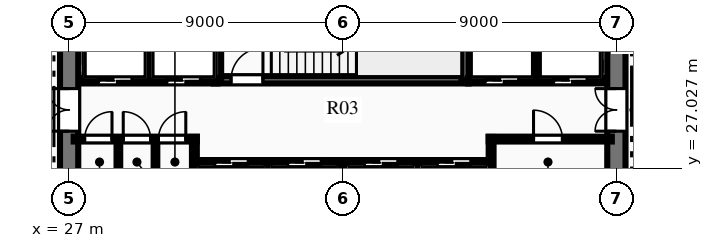
"""IFC4 building model, lengths in metres.
Left out: names, types, materials, properties, quantities, classifications, styles, units other than length and angle.
Written with IfcOpenShell. Run it as: python <this file> out.ifc"""

import sys

from ifc_helpers import new_model, si_unit, direction, frame, frame_2d, origin, place, context, subcontext, project, spatial, rectangle, extrude, element, fill, save


model = new_model("IFC4")
c1 = context("Model", 3, precision=1e-05, world=origin(), true_north=direction((0.0, 1.0)))
c2 = subcontext(c1, "Body", "Model", "MODEL_VIEW")
j1 = project(units=[si_unit("LENGTHUNIT", "METRE"), si_unit("PLANEANGLEUNIT", "RADIAN")], contexts=[c1])
p1 = place(None, origin())
s1 = spatial("IfcSite", under=j1, at=p1, CompositionType="ELEMENT")
p2 = place(p1, origin())
s2 = spatial("IfcBuilding", under=s1, at=p2, CompositionType="ELEMENT")
p3 = place(p2, frame((0.0, 0.0, 73.95)))
s3 = spatial("IfcBuildingStorey", under=s2, at=p3, CompositionType="ELEMENT", Elevation=73.95)
p4 = place(p3, frame((27.0, 18.3, 0.0), z_axis=(0.0, 0.0, 1.0), x_axis=(0.0, 1.0, 0.0)))
e1 = element("IfcWall", 1, at=p4, inside=s3, PredefinedType="SHEAR", context=c2, shape_type="SweptSolid", body=[
    extrude(rectangle(XDim=15.4, YDim=0.6, at=frame_2d((7.7, 0.0))), origin(), (0.0, 0.0, 1.0), 3.75),
])
p5 = place(p4, frame((9.94, 0.0, 0.0)))
e2 = element("IfcOpeningElement", 2, at=p5, cuts=e1, PredefinedType="OPENING", context=c2, shape_type="SweptSolid", body=[
    extrude(rectangle(XDim=1.4, YDim=2.2, at=frame_2d((0.7, 1.1))), frame((0.0, 0.31, 0.0), z_axis=(0.0, -1.0, 0.0), x_axis=(1.0, 0.0, 0.0)), (0.0, 0.0, 1.0), 0.62),
])
p6 = place(p3, frame((45.0, 18.3, 0.0), z_axis=(0.0, 0.0, 1.0), x_axis=(0.0, 1.0, 0.0)))
e3 = element("IfcWall", 3, at=p6, inside=s3, PredefinedType="SHEAR", context=c2, shape_type="SweptSolid", body=[
    extrude(rectangle(XDim=15.4, YDim=0.6, at=frame_2d((7.7, 0.0))), origin(), (0.0, 0.0, 1.0), 3.75),
])
p7 = place(p6, frame((9.94, 0.0, 0.0)))
e4 = element("IfcOpeningElement", 4, at=p7, cuts=e3, PredefinedType="OPENING", context=c2, shape_type="SweptSolid", body=[
    extrude(rectangle(XDim=1.4, YDim=2.2, at=frame_2d((0.7, 1.1))), frame((0.0, 0.31, 0.0), z_axis=(0.0, -1.0, 0.0), x_axis=(1.0, 0.0, 0.0)), (0.0, 0.0, 1.0), 0.62),
])
p8 = place(p3, frame((31.76, 29.93, 0.0), z_axis=(0.0, 0.0, 1.0), x_axis=(1.0, 0.0, 0.0)))
e5 = element("IfcWall", 5, at=p8, inside=s3, PredefinedType="SHEAR", context=c2, shape_type="SweptSolid", body=[
    extrude(rectangle(XDim=8.38, YDim=0.24, at=frame_2d((4.19, 0.0))), origin(), (0.0, 0.0, 1.0), 3.75),
])
p9 = place(p8, frame((0.565, 0.0, 0.0)))
e6 = element("IfcOpeningElement", 6, at=p9, cuts=e5, PredefinedType="OPENING", context=c2, shape_type="SweptSolid", body=[
    extrude(rectangle(XDim=1.05, YDim=2.15, at=frame_2d((0.525, 1.075))), frame((0.0, 0.13, 0.0), z_axis=(0.0, -1.0, 0.0), x_axis=(1.0, 0.0, 0.0)), (0.0, 0.0, 1.0), 0.26),
])
p10 = place(p3, frame((31.88, 29.93, 0.0), z_axis=(0.0, 0.0, 1.0), x_axis=(0.0, 1.0, 0.0)))
e7 = element("IfcWall", 7, at=p10, inside=s3, PredefinedType="SHEAR", context=c2, shape_type="SweptSolid", body=[
    extrude(rectangle(XDim=3.79, YDim=0.24, at=frame_2d((1.895, 0.0))), origin(), (0.0, 0.0, 1.0), 3.75),
])
p11 = place(p3, frame((40.02, 29.93, 0.0), z_axis=(0.0, 0.0, 1.0), x_axis=(0.0, 1.0, 0.0)))
e8 = element("IfcWall", 8, at=p11, inside=s3, PredefinedType="SHEAR", context=c2, shape_type="SweptSolid", body=[
    extrude(rectangle(XDim=3.85, YDim=0.24, at=frame_2d((1.925, 0.0))), origin(), (0.0, 0.0, 1.0), 3.75),
])
p12 = place(p3, frame((27.15, 27.98, 0.0), z_axis=(0.0, 0.0, 1.0), x_axis=(1.0, 0.0, 0.0)))
e9 = element("IfcWall", 9, at=p12, inside=s3, PredefinedType="PARTITIONING", context=c2, shape_type="SweptSolid", body=[
    extrude(rectangle(XDim=4.05, YDim=0.16, at=frame_2d((2.025, 0.0))), origin(), (0.0, 0.0, 1.0), 3.44),
])
p13 = place(p12, frame((0.36, 0.0, 0.0)))
e10 = element("IfcOpeningElement", 10, at=p13, cuts=e9, PredefinedType="OPENING", context=c2, shape_type="SweptSolid", body=[
    extrude(rectangle(XDim=0.9, YDim=2.15, at=frame_2d((0.45, 1.075))), frame((0.0, 0.09, 0.0), z_axis=(0.0, -1.0, 0.0), x_axis=(1.0, 0.0, 0.0)), (0.0, 0.0, 1.0), 0.18),
])
p14 = place(p12, frame((1.63, 0.0, 0.0)))
e11 = element("IfcOpeningElement", 11, at=p14, cuts=e9, PredefinedType="OPENING", context=c2, shape_type="SweptSolid", body=[
    extrude(rectangle(XDim=0.9, YDim=2.15, at=frame_2d((0.45, 1.075))), frame((0.0, 0.09, 0.0), z_axis=(0.0, -1.0, 0.0), x_axis=(1.0, 0.0, 0.0)), (0.0, 0.0, 1.0), 0.18),
])
p15 = place(p12, frame((2.788, 0.0, 0.0)))
e12 = element("IfcOpeningElement", 12, at=p15, cuts=e9, PredefinedType="OPENING", context=c2, shape_type="SweptSolid", body=[
    extrude(rectangle(XDim=0.9, YDim=2.15, at=frame_2d((0.45, 1.075))), frame((0.0, 0.09, 0.0), z_axis=(0.0, -1.0, 0.0), x_axis=(1.0, 0.0, 0.0)), (0.0, 0.0, 1.0), 0.18),
])
p16 = place(p3, frame((31.12, 26.54, 0.0), z_axis=(0.0, 0.0, 1.0), x_axis=(0.0, 1.0, 0.0)))
e13 = element("IfcWall", 13, at=p16, inside=s3, PredefinedType="PARTITIONING", context=c2, shape_type="SweptSolid", body=[
    extrude(rectangle(XDim=1.51, YDim=0.16, at=frame_2d((0.755, 0.0))), origin(), (0.0, 0.0, 1.0), 3.44),
])
p17 = place(p3, frame((40.8, 27.98, 0.0), z_axis=(0.0, 0.0, 1.0), x_axis=(1.0, 0.0, 0.0)))
e14 = element("IfcWall", 14, at=p17, inside=s3, PredefinedType="PARTITIONING", context=c2, shape_type="SweptSolid", body=[
    extrude(rectangle(XDim=4.05, YDim=0.16, at=frame_2d((2.025, 0.0))), origin(), (0.0, 0.0, 1.0), 3.44),
])
p18 = place(p17, frame((1.475, 0.0, 0.0)))
e15 = element("IfcOpeningElement", 15, at=p18, cuts=e14, PredefinedType="OPENING", context=c2, shape_type="SweptSolid", body=[
    extrude(rectangle(XDim=0.95, YDim=2.15, at=frame_2d((0.475, 1.075))), frame((0.0, 0.09, 0.0), z_axis=(0.0, -1.0, 0.0), x_axis=(1.0, 0.0, 0.0)), (0.0, 0.0, 1.0), 0.18),
])
p19 = place(p3, frame((40.88, 26.54, 0.0), z_axis=(0.0, 0.0, 1.0), x_axis=(0.0, 1.0, 0.0)))
e16 = element("IfcWall", 16, at=p19, inside=s3, PredefinedType="PARTITIONING", context=c2, shape_type="SweptSolid", body=[
    extrude(rectangle(XDim=1.51, YDim=0.16, at=frame_2d((0.755, 0.0))), origin(), (0.0, 0.0, 1.0), 3.44),
])
for number, where, z_axis, x_axis in (
    (17, (28.62, 26.54, 0.0), (0.0, 0.0, 1.0), (0.0, 1.0, 0.0)),
    (18, (29.84, 26.54, 0.0), (0.0, 0.0, 1.0), (0.0, 1.0, 0.0)),
):
    element("IfcWall", number, at=place(p3, frame(where, z_axis=z_axis, x_axis=x_axis)), inside=s3, PredefinedType="PARTITIONING", context=c2, shape_type="SweptSolid", body=[
        extrude(rectangle(XDim=1.44, YDim=0.12, at=frame_2d((0.72, 0.0))), origin(), (0.0, 0.0, 1.0), 3.44),
    ])
p20 = place(p3, frame((27.45, 29.9, 0.0), z_axis=(0.0, 0.0, 1.0), x_axis=(1.0, 0.0, 0.0)))
e19 = element("IfcWall", 19, at=p20, inside=s3, PredefinedType="PARTITIONING", context=c2, shape_type="SweptSolid", body=[
    extrude(rectangle(XDim=4.43, YDim=0.18, at=frame_2d((2.215, 0.0))), origin(), (0.0, 0.0, 1.0), 3.44),
])
p21 = place(p20, frame((0.515, 0.0, 0.0)))
e20 = element("IfcOpeningElement", 20, at=p21, cuts=e19, PredefinedType="OPENING", context=c2, shape_type="SweptSolid", body=[
    extrude(rectangle(XDim=1.1, YDim=2.15, at=frame_2d((0.55, 1.075))), frame((0.0, 0.1, 0.0), z_axis=(0.0, -1.0, 0.0), x_axis=(1.0, 0.0, 0.0)), (0.0, 0.0, 1.0), 0.2),
])
p22 = place(p20, frame((2.765, 0.0, 0.0)))
e21 = element("IfcOpeningElement", 21, at=p22, cuts=e19, PredefinedType="OPENING", context=c2, shape_type="SweptSolid", body=[
    extrude(rectangle(XDim=1.1, YDim=2.15, at=frame_2d((0.55, 1.075))), frame((0.0, 0.1, 0.0), z_axis=(0.0, -1.0, 0.0), x_axis=(1.0, 0.0, 0.0)), (0.0, 0.0, 1.0), 0.2),
])
p23 = place(p3, frame((29.63, 29.9, 0.0), z_axis=(0.0, 0.0, 1.0), x_axis=(0.0, 1.0, 0.0)))
e22 = element("IfcWall", 22, at=p23, inside=s3, PredefinedType="PARTITIONING", context=c2, shape_type="SweptSolid", body=[
    extrude(rectangle(XDim=3.75, YDim=0.18, at=frame_2d((1.875, 0.0))), origin(), (0.0, 0.0, 1.0), 3.44),
])
p24 = place(p3, frame((40.12, 29.9, 0.0), z_axis=(0.0, 0.0, 1.0), x_axis=(1.0, 0.0, 0.0)))
e23 = element("IfcWall", 23, at=p24, inside=s3, PredefinedType="PARTITIONING", context=c2, shape_type="SweptSolid", body=[
    extrude(rectangle(XDim=4.43, YDim=0.18, at=frame_2d((2.215, 0.0))), origin(), (0.0, 0.0, 1.0), 3.44),
])
p25 = place(p24, frame((0.565, 0.0, 0.0)))
e24 = element("IfcOpeningElement", 24, at=p25, cuts=e23, PredefinedType="OPENING", context=c2, shape_type="SweptSolid", body=[
    extrude(rectangle(XDim=1.1, YDim=2.15, at=frame_2d((0.55, 1.075))), frame((0.0, 0.1, 0.0), z_axis=(0.0, -1.0, 0.0), x_axis=(1.0, 0.0, 0.0)), (0.0, 0.0, 1.0), 0.2),
])
p26 = place(p24, frame((2.815, 0.0, 0.0)))
e25 = element("IfcOpeningElement", 25, at=p26, cuts=e23, PredefinedType="OPENING", context=c2, shape_type="SweptSolid", body=[
    extrude(rectangle(XDim=1.1, YDim=2.15, at=frame_2d((0.55, 1.075))), frame((0.0, 0.1, 0.0), z_axis=(0.0, -1.0, 0.0), x_axis=(1.0, 0.0, 0.0)), (0.0, 0.0, 1.0), 0.2),
])
p27 = place(p3, frame((42.37, 29.9, 0.0), z_axis=(0.0, 0.0, 1.0), x_axis=(0.0, 1.0, 0.0)))
e26 = element("IfcWall", 26, at=p27, inside=s3, PredefinedType="PARTITIONING", context=c2, shape_type="SweptSolid", body=[
    extrude(rectangle(XDim=3.75, YDim=0.18, at=frame_2d((1.875, 0.0))), origin(), (0.0, 0.0, 1.0), 3.44),
])
p28 = place(p3, frame((31.2, 27.2, 0.0), z_axis=(0.0, 0.0, 1.0), x_axis=(1.0, 0.0, 0.0)))
e27 = element("IfcWall", 27, at=p28, inside=s3, PredefinedType="PARTITIONING", context=c2, shape_type="SweptSolid", body=[
    extrude(rectangle(XDim=9.6, YDim=0.18, at=frame_2d((4.8, 0.0))), origin(), (0.0, 0.0, 1.0), 3.44),
])
p29 = place(p28, frame((0.59, 0.0, 0.0)))
e28 = element("IfcOpeningElement", 28, at=p29, cuts=e27, PredefinedType="OPENING", context=c2, shape_type="SweptSolid", body=[
    extrude(rectangle(XDim=1.1, YDim=2.15, at=frame_2d((0.55, 1.075))), frame((0.0, 0.1, 0.0), z_axis=(0.0, -1.0, 0.0), x_axis=(1.0, 0.0, 0.0)), (0.0, 0.0, 1.0), 0.2),
])
p30 = place(p28, frame((2.99, 0.0, 0.0)))
e29 = element("IfcOpeningElement", 29, at=p30, cuts=e27, PredefinedType="OPENING", context=c2, shape_type="SweptSolid", body=[
    extrude(rectangle(XDim=1.1, YDim=2.15, at=frame_2d((0.55, 1.075))), frame((0.0, 0.1, 0.0), z_axis=(0.0, -1.0, 0.0), x_axis=(1.0, 0.0, 0.0)), (0.0, 0.0, 1.0), 0.2),
])
p31 = place(p28, frame((5.51, 0.0, 0.0)))
e30 = element("IfcOpeningElement", 30, at=p31, cuts=e27, PredefinedType="OPENING", context=c2, shape_type="SweptSolid", body=[
    extrude(rectangle(XDim=1.1, YDim=2.15, at=frame_2d((0.55, 1.075))), frame((0.0, 0.1, 0.0), z_axis=(0.0, -1.0, 0.0), x_axis=(1.0, 0.0, 0.0)), (0.0, 0.0, 1.0), 0.2),
])
p32 = place(p28, frame((7.91, 0.0, 0.0)))
e31 = element("IfcOpeningElement", 31, at=p32, cuts=e27, PredefinedType="OPENING", context=c2, shape_type="SweptSolid", body=[
    extrude(rectangle(XDim=1.1, YDim=2.15, at=frame_2d((0.55, 1.075))), frame((0.0, 0.1, 0.0), z_axis=(0.0, -1.0, 0.0), x_axis=(1.0, 0.0, 0.0)), (0.0, 0.0, 1.0), 0.2),
])
for number, where, z_axis, x_axis in (
    (32, (33.54, 25.3, 0.0), (0.0, 0.0, 1.0), (0.0, 1.0, 0.0)),
    (33, (36.0, 25.3, 0.0), (0.0, 0.0, 1.0), (0.0, 1.0, 0.0)),
    (34, (38.46, 25.3, 0.0), (0.0, 0.0, 1.0), (0.0, 1.0, 0.0)),
):
    element("IfcWall", number, at=place(p3, frame(where, z_axis=z_axis, x_axis=x_axis)), inside=s3, PredefinedType="PARTITIONING", context=c2, shape_type="SweptSolid", body=[
        extrude(rectangle(XDim=1.9, YDim=0.18, at=frame_2d((0.95, 0.0))), origin(), (0.0, 0.0, 1.0), 3.44),
    ])
p33 = place(p13, origin())
e35 = element("IfcDoor", 35, at=p33, inside=s3, OperationType="SINGLE_SWING_RIGHT", PredefinedType="DOOR", context=c2, shape_type="SweptSolid", body=[
    extrude(rectangle(XDim=0.9, YDim=2.15, at=frame_2d((0.45, 1.075))), frame((0.0, 0.025, 0.0), z_axis=(0.0, -1.0, 0.0), x_axis=(1.0, 0.0, 0.0)), (0.0, 0.0, 1.0), 0.05),
])
fill(e10, e35)
p34 = place(p14, origin())
e36 = element("IfcDoor", 36, at=p34, inside=s3, OperationType="SINGLE_SWING_LEFT", PredefinedType="DOOR", context=c2, shape_type="SweptSolid", body=[
    extrude(rectangle(XDim=0.9, YDim=2.15, at=frame_2d((0.45, 1.075))), frame((0.0, 0.025, 0.0), z_axis=(0.0, -1.0, 0.0), x_axis=(1.0, 0.0, 0.0)), (0.0, 0.0, 1.0), 0.05),
])
fill(e11, e36)
p35 = place(p15, origin())
e37 = element("IfcDoor", 37, at=p35, inside=s3, OperationType="SINGLE_SWING_RIGHT", PredefinedType="DOOR", context=c2, shape_type="SweptSolid", body=[
    extrude(rectangle(XDim=0.9, YDim=2.15, at=frame_2d((0.45, 1.075))), frame((0.0, 0.025, 0.0), z_axis=(0.0, -1.0, 0.0), x_axis=(1.0, 0.0, 0.0)), (0.0, 0.0, 1.0), 0.05),
])
fill(e12, e37)
p36 = place(p18, origin())
e38 = element("IfcDoor", 38, at=p36, inside=s3, OperationType="SINGLE_SWING_LEFT", PredefinedType="DOOR", context=c2, shape_type="SweptSolid", body=[
    extrude(rectangle(XDim=0.95, YDim=2.15, at=frame_2d((0.475, 1.075))), frame((0.0, 0.025, 0.0), z_axis=(0.0, -1.0, 0.0), x_axis=(1.0, 0.0, 0.0)), (0.0, 0.0, 1.0), 0.05),
])
fill(e15, e38)
p37 = place(p9, origin())
e39 = element("IfcDoor", 39, at=p37, inside=s3, OperationType="SINGLE_SWING_RIGHT", PredefinedType="DOOR", context=c2, shape_type="SweptSolid", body=[
    extrude(rectangle(XDim=1.05, YDim=2.15, at=frame_2d((0.525, 1.075))), frame((0.0, 0.025, 0.0), z_axis=(0.0, -1.0, 0.0), x_axis=(1.0, 0.0, 0.0)), (0.0, 0.0, 1.0), 0.05),
])
fill(e6, e39)
p38 = place(p5, origin())
e40 = element("IfcDoor", 40, at=p38, inside=s3, OperationType="DOUBLE_DOOR_SINGLE_SWING", PredefinedType="DOOR", context=c2, shape_type="SweptSolid", body=[
    extrude(rectangle(XDim=1.4, YDim=2.2, at=frame_2d((0.7, 1.1))), frame((0.0, 0.025, 0.0), z_axis=(0.0, -1.0, 0.0), x_axis=(1.0, 0.0, 0.0)), (0.0, 0.0, 1.0), 0.05),
])
fill(e2, e40)
p39 = place(p7, origin())
e41 = element("IfcDoor", 41, at=p39, inside=s3, OperationType="DOUBLE_DOOR_SINGLE_SWING", PredefinedType="DOOR", context=c2, shape_type="SweptSolid", body=[
    extrude(rectangle(XDim=1.4, YDim=2.2, at=frame_2d((0.7, 1.1))), frame((0.0, 0.025, 0.0), z_axis=(0.0, -1.0, 0.0), x_axis=(1.0, 0.0, 0.0)), (0.0, 0.0, 1.0), 0.05),
])
fill(e4, e41)
p40 = place(p21, origin())
e42 = element("IfcDoor", 42, at=p40, inside=s3, OperationType="SLIDING_TO_LEFT", PredefinedType="DOOR", context=c2, shape_type="SweptSolid", body=[
    extrude(rectangle(XDim=1.1, YDim=2.15, at=frame_2d((0.55, 1.075))), frame((0.0, 0.025, 0.0), z_axis=(0.0, -1.0, 0.0), x_axis=(1.0, 0.0, 0.0)), (0.0, 0.0, 1.0), 0.05),
])
fill(e20, e42)
p41 = place(p22, origin())
e43 = element("IfcDoor", 43, at=p41, inside=s3, OperationType="SLIDING_TO_LEFT", PredefinedType="DOOR", context=c2, shape_type="SweptSolid", body=[
    extrude(rectangle(XDim=1.1, YDim=2.15, at=frame_2d((0.55, 1.075))), frame((0.0, 0.025, 0.0), z_axis=(0.0, -1.0, 0.0), x_axis=(1.0, 0.0, 0.0)), (0.0, 0.0, 1.0), 0.05),
])
fill(e21, e43)
p42 = place(p25, origin())
e44 = element("IfcDoor", 44, at=p42, inside=s3, OperationType="SLIDING_TO_LEFT", PredefinedType="DOOR", context=c2, shape_type="SweptSolid", body=[
    extrude(rectangle(XDim=1.1, YDim=2.15, at=frame_2d((0.55, 1.075))), frame((0.0, 0.025, 0.0), z_axis=(0.0, -1.0, 0.0), x_axis=(1.0, 0.0, 0.0)), (0.0, 0.0, 1.0), 0.05),
])
fill(e24, e44)
p43 = place(p26, origin())
e45 = element("IfcDoor", 45, at=p43, inside=s3, OperationType="SLIDING_TO_LEFT", PredefinedType="DOOR", context=c2, shape_type="SweptSolid", body=[
    extrude(rectangle(XDim=1.1, YDim=2.15, at=frame_2d((0.55, 1.075))), frame((0.0, 0.025, 0.0), z_axis=(0.0, -1.0, 0.0), x_axis=(1.0, 0.0, 0.0)), (0.0, 0.0, 1.0), 0.05),
])
fill(e25, e45)
p44 = place(p29, origin())
e46 = element("IfcDoor", 46, at=p44, inside=s3, OperationType="SLIDING_TO_LEFT", PredefinedType="DOOR", context=c2, shape_type="SweptSolid", body=[
    extrude(rectangle(XDim=1.1, YDim=2.15, at=frame_2d((0.55, 1.075))), frame((0.0, 0.025, 0.0), z_axis=(0.0, -1.0, 0.0), x_axis=(1.0, 0.0, 0.0)), (0.0, 0.0, 1.0), 0.05),
])
fill(e28, e46)
p45 = place(p30, origin())
e47 = element("IfcDoor", 47, at=p45, inside=s3, OperationType="SLIDING_TO_LEFT", PredefinedType="DOOR", context=c2, shape_type="SweptSolid", body=[
    extrude(rectangle(XDim=1.1, YDim=2.15, at=frame_2d((0.55, 1.075))), frame((0.0, 0.025, 0.0), z_axis=(0.0, -1.0, 0.0), x_axis=(1.0, 0.0, 0.0)), (0.0, 0.0, 1.0), 0.05),
])
fill(e29, e47)
p46 = place(p31, origin())
e48 = element("IfcDoor", 48, at=p46, inside=s3, OperationType="SLIDING_TO_LEFT", PredefinedType="DOOR", context=c2, shape_type="SweptSolid", body=[
    extrude(rectangle(XDim=1.1, YDim=2.15, at=frame_2d((0.55, 1.075))), frame((0.0, 0.025, 0.0), z_axis=(0.0, -1.0, 0.0), x_axis=(1.0, 0.0, 0.0)), (0.0, 0.0, 1.0), 0.05),
])
fill(e30, e48)
p47 = place(p32, origin())
e49 = element("IfcDoor", 49, at=p47, inside=s3, OperationType="SLIDING_TO_LEFT", PredefinedType="DOOR", context=c2, shape_type="SweptSolid", body=[
    extrude(rectangle(XDim=1.1, YDim=2.15, at=frame_2d((0.55, 1.075))), frame((0.0, 0.025, 0.0), z_axis=(0.0, -1.0, 0.0), x_axis=(1.0, 0.0, 0.0)), (0.0, 0.0, 1.0), 0.05),
])
fill(e31, e49)
save(model, sys.argv[1])
